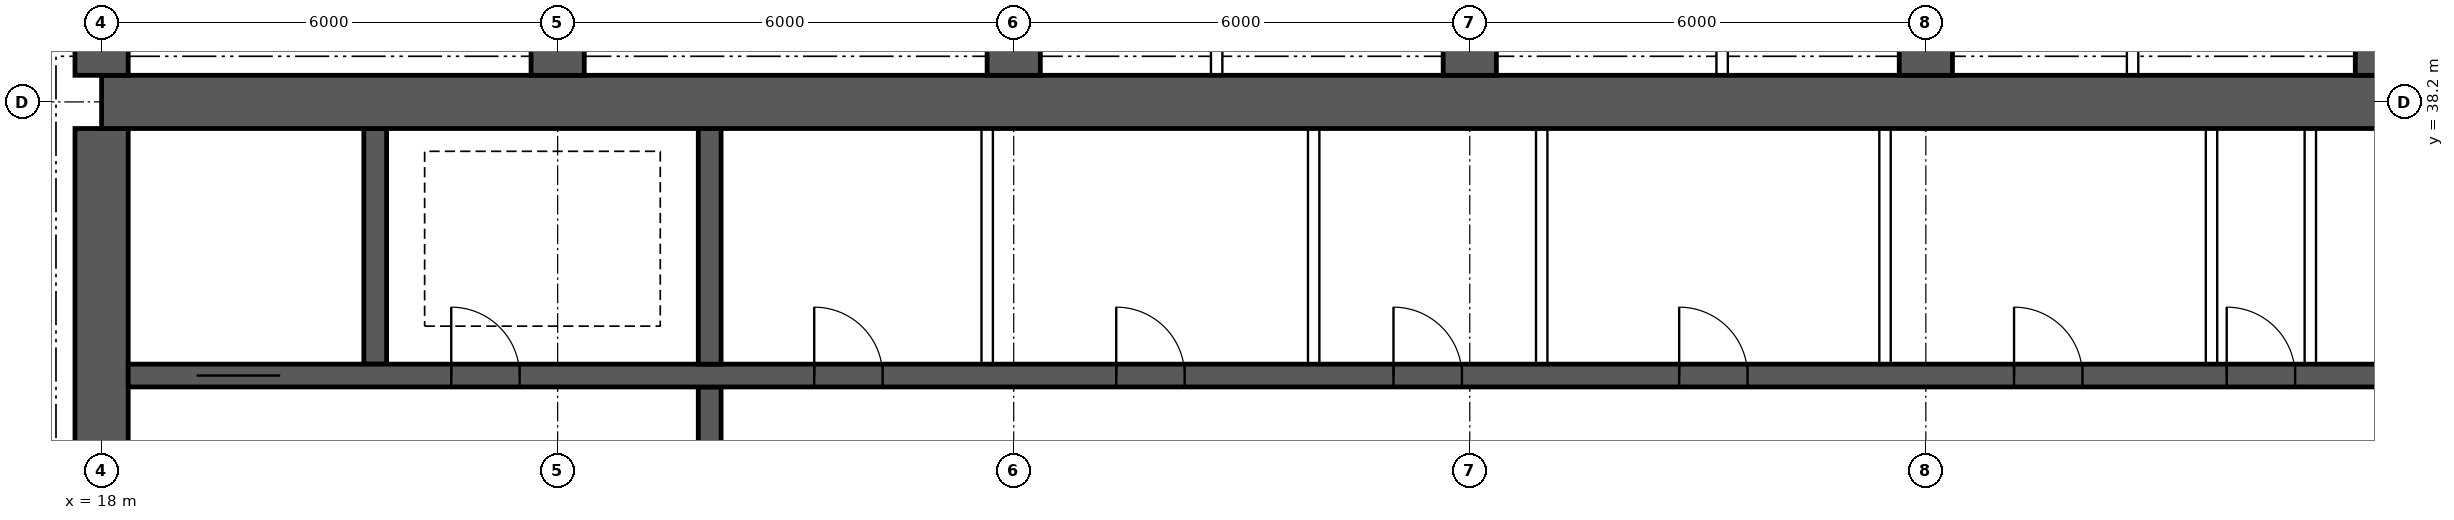
"""IFC4 building model, lengths in metres.
Left out: names, types, materials, properties, quantities, classifications, styles, units other than length and angle.
Written with IfcOpenShell. Run it as: python <this file> out.ifc"""

import sys

from ifc_helpers import new_model, si_unit, direction, frame, frame_2d, origin, place, context, subcontext, project, spatial, rectangle, extrude, element, fill, save


model = new_model("IFC4")
c1 = context("Model", 3, precision=1e-05, world=origin(), true_north=direction((0.0, 1.0)))
c2 = subcontext(c1, "Body", "Model", "MODEL_VIEW")
j1 = project(units=[si_unit("LENGTHUNIT", "METRE"), si_unit("PLANEANGLEUNIT", "RADIAN")], contexts=[c1])
p1 = place(None, origin())
s1 = spatial("IfcSite", under=j1, at=p1, CompositionType="ELEMENT")
p2 = place(p1, origin())
s2 = spatial("IfcBuilding", under=s1, at=p2, CompositionType="ELEMENT")
p3 = place(p2, frame((0.0, 0.0, 231.55)))
s3 = spatial("IfcBuildingStorey", under=s2, at=p3, CompositionType="ELEMENT", Elevation=231.55)
p4 = place(p3, frame((18.0, 38.2, 0.0), z_axis=(0.0, 0.0, 1.0), x_axis=(1.0, 0.0, 0.0)))
e1 = element("IfcWall", 1, at=p4, inside=s3, PredefinedType="SHEAR", context=c2, shape_type="SweptSolid", body=[
    extrude(rectangle(XDim=48.0, YDim=0.7, at=frame_2d((24.0, 0.0))), origin(), (0.0, 0.0, 1.0), 3.75),
])
p5 = place(p3, frame((18.0, 26.15, 0.0), z_axis=(0.0, 0.0, 1.0), x_axis=(0.0, 1.0, 0.0)))
e2 = element("IfcWall", 2, at=p5, inside=s3, PredefinedType="SHEAR", context=c2, shape_type="SweptSolid", body=[
    extrude(rectangle(XDim=11.7, YDim=0.7, at=frame_2d((5.85, 0.0))), origin(), (0.0, 0.0, 1.0), 3.75),
])
p6 = place(p5, frame((5.15, 0.0, 0.0)))
e3 = element("IfcOpeningElement", 3, at=p6, cuts=e2, PredefinedType="OPENING", context=c2, shape_type="SweptSolid", body=[
    extrude(rectangle(XDim=1.2, YDim=2.1, at=frame_2d((0.6, 1.05))), frame((0.0, 0.36, 0.0), z_axis=(0.0, -1.0, 0.0), x_axis=(1.0, 0.0, 0.0)), (0.0, 0.0, 1.0), 0.72),
])
p7 = place(p3, frame((18.35, 34.6, 0.0), z_axis=(0.0, 0.0, 1.0), x_axis=(1.0, 0.0, 0.0)))
e4 = element("IfcWall", 4, at=p7, inside=s3, PredefinedType="SHEAR", context=c2, shape_type="SweptSolid", body=[
    extrude(rectangle(XDim=47.3, YDim=0.3, at=frame_2d((23.65, 0.0))), origin(), (0.0, 0.0, 1.0), 3.75),
])
p8 = place(p7, frame((0.9, 0.0, 0.0)))
e5 = element("IfcOpeningElement", 5, at=p8, cuts=e4, PredefinedType="OPENING", context=c2, shape_type="SweptSolid", body=[
    extrude(rectangle(XDim=1.1, YDim=2.1, at=frame_2d((0.55, 1.05))), frame((0.0, 0.16, 0.0), z_axis=(0.0, -1.0, 0.0), x_axis=(1.0, 0.0, 0.0)), (0.0, 0.0, 1.0), 0.32),
])
p9 = place(p7, frame((45.3, 0.0, 0.0)))
e6 = element("IfcOpeningElement", 6, at=p9, cuts=e4, PredefinedType="OPENING", context=c2, shape_type="SweptSolid", body=[
    extrude(rectangle(XDim=1.1, YDim=2.1, at=frame_2d((0.55, 1.05))), frame((0.0, 0.16, 0.0), z_axis=(0.0, -1.0, 0.0), x_axis=(1.0, 0.0, 0.0)), (0.0, 0.0, 1.0), 0.32),
])
p10 = place(p7, frame((4.25, 0.0, 0.0)))
e7 = element("IfcOpeningElement", 7, at=p10, cuts=e4, PredefinedType="OPENING", context=c2, shape_type="SweptSolid", body=[
    extrude(rectangle(XDim=0.9, YDim=2.1, at=frame_2d((0.45, 1.05))), frame((0.0, 0.16, 0.0), z_axis=(0.0, -1.0, 0.0), x_axis=(1.0, 0.0, 0.0)), (0.0, 0.0, 1.0), 0.32),
])
p11 = place(p7, frame((42.15, 0.0, 0.0)))
e8 = element("IfcOpeningElement", 8, at=p11, cuts=e4, PredefinedType="OPENING", context=c2, shape_type="SweptSolid", body=[
    extrude(rectangle(XDim=0.9, YDim=2.1, at=frame_2d((0.45, 1.05))), frame((0.0, 0.16, 0.0), z_axis=(0.0, -1.0, 0.0), x_axis=(1.0, 0.0, 0.0)), (0.0, 0.0, 1.0), 0.32),
])
p12 = place(p7, frame((9.025, 0.0, 0.0)))
e9 = element("IfcOpeningElement", 9, at=p12, cuts=e4, PredefinedType="OPENING", context=c2, shape_type="SweptSolid", body=[
    extrude(rectangle(XDim=0.9, YDim=2.1, at=frame_2d((0.45, 1.05))), frame((0.0, 0.16, 0.0), z_axis=(0.0, -1.0, 0.0), x_axis=(1.0, 0.0, 0.0)), (0.0, 0.0, 1.0), 0.32),
])
p13 = place(p7, frame((12.999, 0.0, 0.0)))
e10 = element("IfcOpeningElement", 10, at=p13, cuts=e4, PredefinedType="OPENING", context=c2, shape_type="SweptSolid", body=[
    extrude(rectangle(XDim=0.9, YDim=2.1, at=frame_2d((0.45, 1.05))), frame((0.0, 0.16, 0.0), z_axis=(0.0, -1.0, 0.0), x_axis=(1.0, 0.0, 0.0)), (0.0, 0.0, 1.0), 0.32),
])
p14 = place(p7, frame((16.646, 0.0, 0.0)))
e11 = element("IfcOpeningElement", 11, at=p14, cuts=e4, PredefinedType="OPENING", context=c2, shape_type="SweptSolid", body=[
    extrude(rectangle(XDim=0.9, YDim=2.1, at=frame_2d((0.45, 1.05))), frame((0.0, 0.16, 0.0), z_axis=(0.0, -1.0, 0.0), x_axis=(1.0, 0.0, 0.0)), (0.0, 0.0, 1.0), 0.32),
])
p15 = place(p7, frame((20.405, 0.0, 0.0)))
e12 = element("IfcOpeningElement", 12, at=p15, cuts=e4, PredefinedType="OPENING", context=c2, shape_type="SweptSolid", body=[
    extrude(rectangle(XDim=0.9, YDim=2.1, at=frame_2d((0.45, 1.05))), frame((0.0, 0.16, 0.0), z_axis=(0.0, -1.0, 0.0), x_axis=(1.0, 0.0, 0.0)), (0.0, 0.0, 1.0), 0.32),
])
p16 = place(p7, frame((24.811, 0.0, 0.0)))
e13 = element("IfcOpeningElement", 13, at=p16, cuts=e4, PredefinedType="OPENING", context=c2, shape_type="SweptSolid", body=[
    extrude(rectangle(XDim=0.9, YDim=2.1, at=frame_2d((0.45, 1.05))), frame((0.0, 0.16, 0.0), z_axis=(0.0, -1.0, 0.0), x_axis=(1.0, 0.0, 0.0)), (0.0, 0.0, 1.0), 0.32),
])
p17 = place(p7, frame((27.608, 0.0, 0.0)))
e14 = element("IfcOpeningElement", 14, at=p17, cuts=e4, PredefinedType="OPENING", context=c2, shape_type="SweptSolid", body=[
    extrude(rectangle(XDim=0.9, YDim=2.1, at=frame_2d((0.45, 1.05))), frame((0.0, 0.16, 0.0), z_axis=(0.0, -1.0, 0.0), x_axis=(1.0, 0.0, 0.0)), (0.0, 0.0, 1.0), 0.32),
])
p18 = place(p7, frame((33.729, 0.0, 0.0)))
e15 = element("IfcOpeningElement", 15, at=p18, cuts=e4, PredefinedType="OPENING", context=c2, shape_type="SweptSolid", body=[
    extrude(rectangle(XDim=0.9, YDim=2.1, at=frame_2d((0.45, 1.05))), frame((0.0, 0.16, 0.0), z_axis=(0.0, -1.0, 0.0), x_axis=(1.0, 0.0, 0.0)), (0.0, 0.0, 1.0), 0.32),
])
p19 = place(p3, frame((26.0, 30.55, 0.0), z_axis=(0.0, 0.0, 1.0), x_axis=(0.0, 1.0, 0.0)))
e16 = element("IfcWall", 16, at=p19, inside=s3, PredefinedType="SHEAR", context=c2, shape_type="SweptSolid", body=[
    extrude(rectangle(XDim=3.9, YDim=0.3, at=frame_2d((1.95, 0.0))), origin(), (0.0, 0.0, 1.0), 3.75),
])
p20 = place(p19, frame((1.4, 0.0, 0.0)))
e17 = element("IfcOpeningElement", 17, at=p20, cuts=e16, PredefinedType="OPENING", context=c2, shape_type="SweptSolid", body=[
    extrude(rectangle(XDim=1.2, YDim=2.1, at=frame_2d((0.6, 1.05))), frame((0.0, 0.16, 0.0), z_axis=(0.0, -1.0, 0.0), x_axis=(1.0, 0.0, 0.0)), (0.0, 0.0, 1.0), 0.32),
])
for number, where, z_axis, x_axis in (
    (18, (21.6, 34.75, 0.0), (0.0, 0.0, 1.0), (0.0, 1.0, 0.0)),
    (19, (26.0, 34.75, 0.0), (0.0, 0.0, 1.0), (0.0, 1.0, 0.0)),
):
    element("IfcWall", number, at=place(p3, frame(where, z_axis=z_axis, x_axis=x_axis)), inside=s3, PredefinedType="SHEAR", context=c2, shape_type="SweptSolid", body=[
        extrude(rectangle(XDim=3.1, YDim=0.3, at=frame_2d((1.55, 0.0))), origin(), (0.0, 0.0, 1.0), 3.75),
    ])
for number, where, z_axis, x_axis in (
    (20, (18.0, 38.55, 0.0), (0.0, 0.0, 1.0), (0.0, 1.0, 0.0)),
    (21, (24.0, 38.55, 0.0), (0.0, 0.0, 1.0), (0.0, 1.0, 0.0)),
    (22, (30.0, 38.55, 0.0), (0.0, 0.0, 1.0), (0.0, 1.0, 0.0)),
    (23, (36.0, 38.55, 0.0), (0.0, 0.0, 1.0), (0.0, 1.0, 0.0)),
    (24, (42.0, 38.55, 0.0), (0.0, 0.0, 1.0), (0.0, 1.0, 0.0)),
    (25, (48.0, 38.55, 0.0), (0.0, 0.0, 1.0), (0.0, 1.0, 0.0)),
):
    element("IfcWall", number, at=place(p3, frame(where, z_axis=z_axis, x_axis=x_axis)), inside=s3, PredefinedType="SHEAR", context=c2, shape_type="SweptSolid", body=[
        extrude(rectangle(XDim=7.05, YDim=0.7, at=frame_2d((3.525, 0.0))), origin(), (0.0, 0.0, 1.0), 3.75),
    ])
for number, where, z_axis, x_axis in (
    (26, (29.651, 34.75, 0.0), (0.0, 0.0, 1.0), (0.0, 1.0, 0.0)),
    (27, (33.946, 34.75, 0.0), (0.0, 0.0, 1.0), (0.0, 1.0, 0.0)),
    (28, (36.946, 34.75, 0.0), (0.0, 0.0, 1.0), (0.0, 1.0, 0.0)),
    (29, (41.463, 34.75, 0.0), (0.0, 0.0, 1.0), (0.0, 1.0, 0.0)),
    (30, (45.758, 34.75, 0.0), (0.0, 0.0, 1.0), (0.0, 1.0, 0.0)),
    (31, (47.058, 34.75, 0.0), (0.0, 0.0, 1.0), (0.0, 1.0, 0.0)),
):
    element("IfcWall", number, at=place(p3, frame(where, z_axis=z_axis, x_axis=x_axis)), inside=s3, PredefinedType="SOLIDWALL", context=c2, shape_type="SweptSolid", body=[
        extrude(rectangle(XDim=3.1, YDim=0.15, at=frame_2d((1.55, 0.0))), origin(), (0.0, 0.0, 1.0), 3.5),
    ])
for number, where, z_axis, x_axis in (
    (32, (32.67, 38.55, 0.0), (0.0, 0.0, 1.0), (0.0, 1.0, 0.0)),
    (33, (39.32, 38.55, 0.0), (0.0, 0.0, 1.0), (0.0, 1.0, 0.0)),
    (34, (44.72, 38.55, 0.0), (0.0, 0.0, 1.0), (0.0, 1.0, 0.0)),
):
    element("IfcWall", number, at=place(p3, frame(where, z_axis=z_axis, x_axis=x_axis)), inside=s3, PredefinedType="PARTITIONING", context=c2, shape_type="SweptSolid", body=[
        extrude(rectangle(XDim=6.95, YDim=0.15, at=frame_2d((3.475, 0.0))), origin(), (0.0, 0.0, 1.0), 3.5),
    ])
p21 = place(p8, origin())
e35 = element("IfcDoor", 35, at=p21, inside=s3, OperationType="DOUBLE_DOOR_SLIDING", PredefinedType="DOOR", context=c2, shape_type="SweptSolid", body=[
    extrude(rectangle(XDim=1.1, YDim=2.1, at=frame_2d((0.55, 1.05))), frame((0.0, 0.025, 0.0), z_axis=(0.0, -1.0, 0.0), x_axis=(1.0, 0.0, 0.0)), (0.0, 0.0, 1.0), 0.05),
])
fill(e5, e35)
p22 = place(p10, origin())
e36 = element("IfcDoor", 36, at=p22, inside=s3, OperationType="SINGLE_SWING_LEFT", PredefinedType="DOOR", context=c2, shape_type="SweptSolid", body=[
    extrude(rectangle(XDim=0.9, YDim=2.1, at=frame_2d((0.45, 1.05))), frame((0.0, 0.025, 0.0), z_axis=(0.0, -1.0, 0.0), x_axis=(1.0, 0.0, 0.0)), (0.0, 0.0, 1.0), 0.05),
])
fill(e7, e36)
p23 = place(p12, origin())
e37 = element("IfcDoor", 37, at=p23, inside=s3, OperationType="SINGLE_SWING_LEFT", PredefinedType="DOOR", context=c2, shape_type="SweptSolid", body=[
    extrude(rectangle(XDim=0.9, YDim=2.1, at=frame_2d((0.45, 1.05))), frame((0.0, 0.025, 0.0), z_axis=(0.0, -1.0, 0.0), x_axis=(1.0, 0.0, 0.0)), (0.0, 0.0, 1.0), 0.05),
])
fill(e9, e37)
p24 = place(p13, origin())
e38 = element("IfcDoor", 38, at=p24, inside=s3, OperationType="SINGLE_SWING_LEFT", PredefinedType="DOOR", context=c2, shape_type="SweptSolid", body=[
    extrude(rectangle(XDim=0.9, YDim=2.1, at=frame_2d((0.45, 1.05))), frame((0.0, 0.025, 0.0), z_axis=(0.0, -1.0, 0.0), x_axis=(1.0, 0.0, 0.0)), (0.0, 0.0, 1.0), 0.05),
])
fill(e10, e38)
p25 = place(p14, origin())
e39 = element("IfcDoor", 39, at=p25, inside=s3, OperationType="SINGLE_SWING_LEFT", PredefinedType="DOOR", context=c2, shape_type="SweptSolid", body=[
    extrude(rectangle(XDim=0.9, YDim=2.1, at=frame_2d((0.45, 1.05))), frame((0.0, 0.025, 0.0), z_axis=(0.0, -1.0, 0.0), x_axis=(1.0, 0.0, 0.0)), (0.0, 0.0, 1.0), 0.05),
])
fill(e11, e39)
p26 = place(p15, origin())
e40 = element("IfcDoor", 40, at=p26, inside=s3, OperationType="SINGLE_SWING_LEFT", PredefinedType="DOOR", context=c2, shape_type="SweptSolid", body=[
    extrude(rectangle(XDim=0.9, YDim=2.1, at=frame_2d((0.45, 1.05))), frame((0.0, 0.025, 0.0), z_axis=(0.0, -1.0, 0.0), x_axis=(1.0, 0.0, 0.0)), (0.0, 0.0, 1.0), 0.05),
])
fill(e12, e40)
p27 = place(p16, origin())
e41 = element("IfcDoor", 41, at=p27, inside=s3, OperationType="SINGLE_SWING_LEFT", PredefinedType="DOOR", context=c2, shape_type="SweptSolid", body=[
    extrude(rectangle(XDim=0.9, YDim=2.1, at=frame_2d((0.45, 1.05))), frame((0.0, 0.025, 0.0), z_axis=(0.0, -1.0, 0.0), x_axis=(1.0, 0.0, 0.0)), (0.0, 0.0, 1.0), 0.05),
])
fill(e13, e41)
p28 = place(p17, origin())
e42 = element("IfcDoor", 42, at=p28, inside=s3, OperationType="SINGLE_SWING_LEFT", PredefinedType="DOOR", context=c2, shape_type="SweptSolid", body=[
    extrude(rectangle(XDim=0.9, YDim=2.1, at=frame_2d((0.45, 1.05))), frame((0.0, 0.025, 0.0), z_axis=(0.0, -1.0, 0.0), x_axis=(1.0, 0.0, 0.0)), (0.0, 0.0, 1.0), 0.05),
])
fill(e14, e42)
save(model, sys.argv[1])
